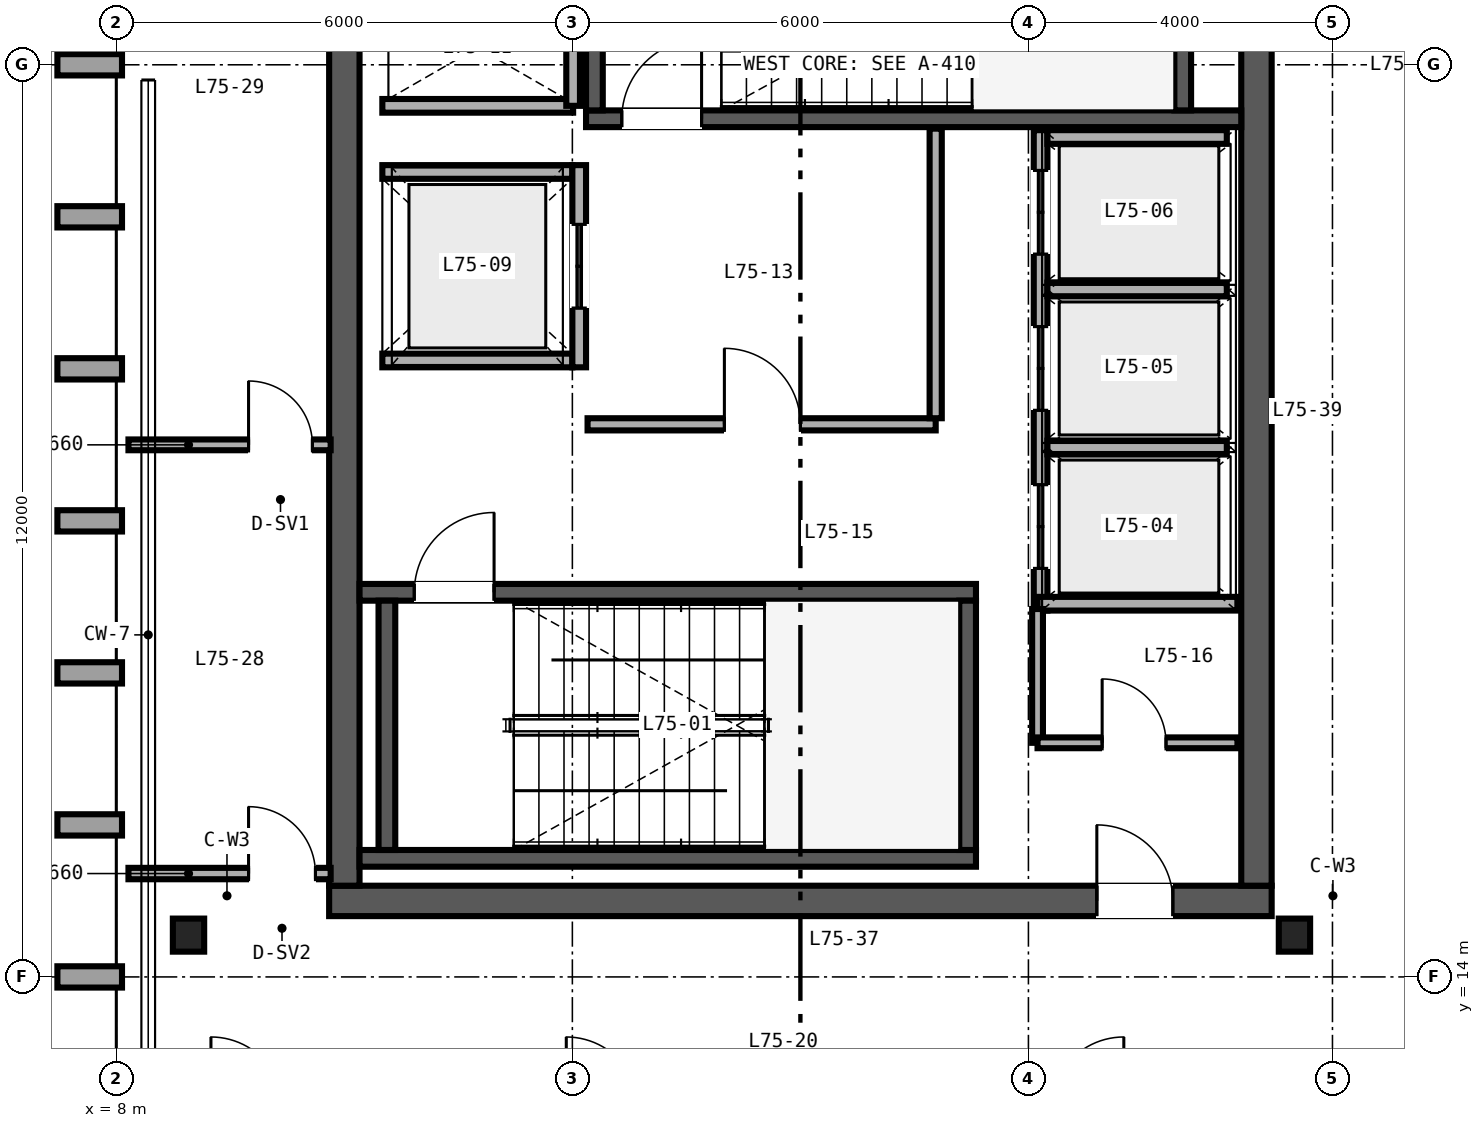
"""IFC4 building model, lengths in metres.
Left out: names, types, materials, properties, quantities, classifications, styles, units other than length and angle.
Written with IfcOpenShell. Run it as: python <this file> out.ifc"""

import sys

from ifc_helpers import new_model, si_unit, direction, frame, frame_2d, origin, origin_2d, place, context, subcontext, project, spatial, rectangle, i_section, extrude, source, transform, mapped, element, fill, save


model = new_model("IFC4")
c1 = context("Model", 3, precision=1e-05, world=origin(), true_north=direction((0.0, 1.0)))
c2 = subcontext(c1, "Body", "Model", "MODEL_VIEW")
j1 = project(units=[si_unit("LENGTHUNIT", "METRE"), si_unit("PLANEANGLEUNIT", "RADIAN")], contexts=[c1])
p1 = place(None, origin())
s1 = spatial("IfcSite", under=j1, at=p1, CompositionType="ELEMENT")
p2 = place(p1, origin())
s2 = spatial("IfcBuilding", under=s1, at=p2, CompositionType="ELEMENT")
p3 = place(p2, frame((0.0, 0.0, 294.0)))
s3 = spatial("IfcBuildingStorey", under=s2, at=p3, CompositionType="ELEMENT", Elevation=294.0)
p4 = place(p3, frame((10.8, 15.0, 0.0), z_axis=(0.0, 0.0, 1.0), x_axis=(1.0, 0.0, 0.0)))
e1 = element("IfcWall", 1, at=p4, inside=s3, PredefinedType="SHEAR", context=c2, shape_type="SweptSolid", body=[
    extrude(rectangle(XDim=12.4, YDim=0.4, at=frame_2d((6.2, 0.0))), origin(), (0.0, 0.0, 1.0), 3.38),
])
p5 = place(p4, frame((10.1, 0.0, 0.0)))
e2 = element("IfcOpeningElement", 2, at=p5, cuts=e1, PredefinedType="OPENING", context=c2, shape_type="SweptSolid", body=[
    extrude(rectangle(XDim=1.0, YDim=2.15, at=frame_2d((0.5, 1.075))), frame((0.0, 0.21, 0.0), z_axis=(0.0, -1.0, 0.0), x_axis=(1.0, 0.0, 0.0)), (0.0, 0.0, 1.0), 0.42),
])
for number, where, z_axis, x_axis in (
    (3, (11.0, 15.2, 0.0), (0.0, 0.0, 1.0), (0.0, 1.0, 0.0)),
    (4, (23.0, 15.2, 0.0), (0.0, 0.0, 1.0), (0.0, 1.0, 0.0)),
):
    element("IfcWall", number, at=place(p3, frame(where, z_axis=z_axis, x_axis=x_axis)), inside=s3, PredefinedType="SHEAR", context=c2, shape_type="SweptSolid", body=[
        extrude(rectangle(XDim=21.6, YDim=0.4, at=frame_2d((10.8, 0.0))), origin(), (0.0, 0.0, 1.0), 3.38),
    ])
p6 = place(p3, frame((11.2, 15.56, 0.0), z_axis=(0.0, 0.0, 1.0), x_axis=(1.0, 0.0, 0.0)))
e5 = element("IfcWall", 5, at=p6, inside=s3, PredefinedType="SHEAR", context=c2, shape_type="SweptSolid", body=[
    extrude(rectangle(XDim=8.11, YDim=0.22, at=frame_2d((4.055, 0.0))), origin(), (0.0, 0.0, 1.0), 3.4),
])
p7 = place(p3, frame((11.2, 19.06, 0.0), z_axis=(0.0, 0.0, 1.0), x_axis=(1.0, 0.0, 0.0)))
e6 = element("IfcWall", 6, at=p7, inside=s3, PredefinedType="SHEAR", context=c2, shape_type="SweptSolid", body=[
    extrude(rectangle(XDim=8.11, YDim=0.22, at=frame_2d((4.055, 0.0))), origin(), (0.0, 0.0, 1.0), 3.4),
])
p8 = place(p7, frame((0.72, 0.0, 0.0)))
e7 = element("IfcOpeningElement", 7, at=p8, cuts=e6, PredefinedType="OPENING", context=c2, shape_type="SweptSolid", body=[
    extrude(rectangle(XDim=1.05, YDim=2.15, at=frame_2d((0.525, 1.075))), frame((0.0, 0.12, 0.0), z_axis=(0.0, -1.0, 0.0), x_axis=(1.0, 0.0, 0.0)), (0.0, 0.0, 1.0), 0.24),
])
for number, where, z_axis, x_axis in (
    (8, (11.56, 15.67, 0.0), (0.0, 0.0, 1.0), (0.0, 1.0, 0.0)),
    (9, (19.2, 15.67, 0.0), (0.0, 0.0, 1.0), (0.0, 1.0, 0.0)),
):
    element("IfcWall", number, at=place(p3, frame(where, z_axis=z_axis, x_axis=x_axis)), inside=s3, PredefinedType="SHEAR", context=c2, shape_type="SweptSolid", body=[
        extrude(rectangle(XDim=3.28, YDim=0.22, at=frame_2d((1.64, 0.0))), origin(), (0.0, 0.0, 1.0), 3.4),
    ])
p9 = place(p3, frame((14.18, 25.29, 0.0), z_axis=(0.0, 0.0, 1.0), x_axis=(1.0, 0.0, 0.0)))
e10 = element("IfcWall", 10, at=p9, inside=s3, PredefinedType="SHEAR", context=c2, shape_type="SweptSolid", body=[
    extrude(rectangle(XDim=8.62, YDim=0.22, at=frame_2d((4.31, 0.0))), origin(), (0.0, 0.0, 1.0), 3.4),
])
p10 = place(p9, frame((0.47, 0.0, 0.0)))
e11 = element("IfcOpeningElement", 11, at=p10, cuts=e10, PredefinedType="OPENING", context=c2, shape_type="SweptSolid", body=[
    extrude(rectangle(XDim=1.05, YDim=2.15, at=frame_2d((0.525, 1.075))), frame((0.0, 0.12, 0.0), z_axis=(0.0, -1.0, 0.0), x_axis=(1.0, 0.0, 0.0)), (0.0, 0.0, 1.0), 0.24),
])
for number, where, z_axis, x_axis in (
    (12, (14.29, 25.4, 0.0), (0.0, 0.0, 1.0), (0.0, 1.0, 0.0)),
    (13, (22.03, 25.4, 0.0), (0.0, 0.0, 1.0), (0.0, 1.0, 0.0)),
):
    element("IfcWall", number, at=place(p3, frame(where, z_axis=z_axis, x_axis=x_axis)), inside=s3, PredefinedType="SHEAR", context=c2, shape_type="SweptSolid", body=[
        extrude(rectangle(XDim=3.28, YDim=0.22, at=frame_2d((1.64, 0.0))), origin(), (0.0, 0.0, 1.0), 3.4),
    ])
m1 = source(origin(), c2, "Body", "SweptSolid", [
    extrude(i_section(OverallWidth=0.412, OverallDepth=0.435, WebThickness=0.036, FlangeThickness=0.057, FilletRadius=0.025, at=origin_2d()), origin(), (0.0, 0.0, 1.0), 3.38),
])
for number, where, z_axis, x_axis in (
    (14, (8.95, 14.55, 0.0), (0.0, 0.0, 1.0), (1.0, 0.0, 0.0)),
    (15, (23.5, 14.55, 0.0), (0.0, 0.0, 1.0), (1.0, 0.0, 0.0)),
):
    element("IfcColumn", number, at=place(p3, frame(where, z_axis=z_axis, x_axis=x_axis)), inside=s3, PredefinedType="COLUMN", context=c2, shape_type="MappedRepresentation", body=[
        mapped(m1, transform((0.0, 0.0, 0.0), scale=1.0)),
    ])
p11 = place(p3, frame((20.16, 18.82, 0.0), z_axis=(0.0, 0.0, 1.0), x_axis=(0.0, 1.0, 0.0)))
e16 = element("IfcWall", 16, at=p11, inside=s3, PredefinedType="SOLIDWALL", context=c2, shape_type="SweptSolid", body=[
    extrude(rectangle(XDim=6.32, YDim=0.18, at=frame_2d((3.16, 0.0))), origin(), (0.0, 0.0, 1.0), 2.48),
])
p12 = place(p11, frame((0.555, 0.0, 0.0)))
e17 = element("IfcOpeningElement", 17, at=p12, cuts=e16, PredefinedType="OPENING", context=c2, shape_type="SweptSolid", body=[
    extrude(rectangle(XDim=1.1, YDim=2.2, at=frame_2d((0.55, 1.1))), frame((0.0, 0.1, 0.0), z_axis=(0.0, -1.0, 0.0), x_axis=(1.0, 0.0, 0.0)), (0.0, 0.0, 1.0), 0.2),
])
p13 = place(p11, frame((2.635, 0.0, 0.0)))
e18 = element("IfcOpeningElement", 18, at=p13, cuts=e16, PredefinedType="OPENING", context=c2, shape_type="SweptSolid", body=[
    extrude(rectangle(XDim=1.1, YDim=2.2, at=frame_2d((0.55, 1.1))), frame((0.0, 0.1, 0.0), z_axis=(0.0, -1.0, 0.0), x_axis=(1.0, 0.0, 0.0)), (0.0, 0.0, 1.0), 0.2),
])
p14 = place(p11, frame((4.69, 0.0, 0.0)))
e19 = element("IfcOpeningElement", 19, at=p14, cuts=e16, PredefinedType="OPENING", context=c2, shape_type="SweptSolid", body=[
    extrude(rectangle(XDim=1.1, YDim=2.2, at=frame_2d((0.55, 1.1))), frame((0.0, 0.1, 0.0), z_axis=(0.0, -1.0, 0.0), x_axis=(1.0, 0.0, 0.0)), (0.0, 0.0, 1.0), 0.2),
])
p15 = place(p3, frame((20.12, 18.91, 0.0), z_axis=(0.0, 0.0, 1.0), x_axis=(1.0, 0.0, 0.0)))
e20 = element("IfcWall", 20, at=p15, inside=s3, PredefinedType="SOLIDWALL", context=c2, shape_type="SweptSolid", body=[
    extrude(rectangle(XDim=2.63, YDim=0.18, at=frame_2d((1.315, 0.0))), origin(), (0.0, 0.0, 1.0), 3.38),
])
p16 = place(p3, frame((20.25, 25.05, 0.0), z_axis=(0.0, 0.0, 1.0), x_axis=(1.0, 0.0, 0.0)))
e21 = element("IfcWall", 21, at=p16, inside=s3, PredefinedType="SOLIDWALL", context=c2, shape_type="SweptSolid", body=[
    extrude(rectangle(XDim=2.36, YDim=0.18, at=frame_2d((1.18, 0.0))), origin(), (0.0, 0.0, 1.0), 3.38),
])
p17 = place(p3, frame((20.25, 20.965, 0.0), z_axis=(0.0, 0.0, 1.0), x_axis=(1.0, 0.0, 0.0)))
e22 = element("IfcWall", 22, at=p17, inside=s3, PredefinedType="SOLIDWALL", context=c2, shape_type="SweptSolid", body=[
    extrude(rectangle(XDim=2.36, YDim=0.18, at=frame_2d((1.18, 0.0))), origin(), (0.0, 0.0, 1.0), 2.48),
])
p18 = place(p3, frame((20.25, 23.045, 0.0), z_axis=(0.0, 0.0, 1.0), x_axis=(1.0, 0.0, 0.0)))
e23 = element("IfcWall", 23, at=p18, inside=s3, PredefinedType="SOLIDWALL", context=c2, shape_type="SweptSolid", body=[
    extrude(rectangle(XDim=2.36, YDim=0.18, at=frame_2d((1.18, 0.0))), origin(), (0.0, 0.0, 1.0), 3.38),
])
for number, where, z_axis, x_axis in (
    (24, (11.5, 22.11, 0.0), (0.0, 0.0, 1.0), (1.0, 0.0, 0.0)),
    (25, (11.5, 24.59, 0.0), (0.0, 0.0, 1.0), (1.0, 0.0, 0.0)),
):
    element("IfcWall", number, at=place(p3, frame(where, z_axis=z_axis, x_axis=x_axis)), inside=s3, PredefinedType="SOLIDWALL", context=c2, shape_type="SweptSolid", body=[
        extrude(rectangle(XDim=2.5, YDim=0.18, at=frame_2d((1.25, 0.0))), origin(), (0.0, 0.0, 1.0), 3.38),
    ])
p19 = place(p3, frame((14.09, 22.02, 0.0), z_axis=(0.0, 0.0, 1.0), x_axis=(0.0, 1.0, 0.0)))
e26 = element("IfcWall", 26, at=p19, inside=s3, PredefinedType="SOLIDWALL", context=c2, shape_type="SweptSolid", body=[
    extrude(rectangle(XDim=2.66, YDim=0.18, at=frame_2d((1.33, 0.0))), origin(), (0.0, 0.0, 1.0), 3.38),
])
p20 = place(p19, frame((0.78, 0.0, 0.0)))
e27 = element("IfcOpeningElement", 27, at=p20, cuts=e26, PredefinedType="OPENING", context=c2, shape_type="SweptSolid", body=[
    extrude(rectangle(XDim=1.1, YDim=2.2, at=frame_2d((0.55, 1.1))), frame((0.0, 0.1, 0.0), z_axis=(0.0, -1.0, 0.0), x_axis=(1.0, 0.0, 0.0)), (0.0, 0.0, 1.0), 0.2),
])
p21 = place(p3, frame((11.5, 25.46, 0.0), z_axis=(0.0, 0.0, 1.0), x_axis=(1.0, 0.0, 0.0)))
e28 = element("IfcWall", 28, at=p21, inside=s3, PredefinedType="SOLIDWALL", context=c2, shape_type="SweptSolid", body=[
    extrude(rectangle(XDim=2.51, YDim=0.18, at=frame_2d((1.255, 0.0))), origin(), (0.0, 0.0, 1.0), 3.38),
])
p22 = place(p3, frame((14.01, 25.46, 0.0), z_axis=(0.0, 0.0, 1.0), x_axis=(0.0, 1.0, 0.0)))
e29 = element("IfcWall", 29, at=p22, inside=s3, PredefinedType="SOLIDWALL", context=c2, shape_type="SweptSolid", body=[
    extrude(rectangle(XDim=3.08, YDim=0.18, at=frame_2d((1.54, 0.0))), origin(), (0.0, 0.0, 1.0), 3.38),
])
p23 = place(p3, frame((14.2, 21.27, 0.0), z_axis=(0.0, 0.0, 1.0), x_axis=(1.0, 0.0, 0.0)))
e30 = element("IfcWall", 30, at=p23, inside=s3, PredefinedType="PARTITIONING", context=c2, shape_type="SweptSolid", body=[
    extrude(rectangle(XDim=4.58, YDim=0.16, at=frame_2d((2.29, 0.0))), origin(), (0.0, 0.0, 1.0), 3.38),
])
p24 = place(p23, frame((1.8, 0.0, 0.0)))
e31 = element("IfcOpeningElement", 31, at=p24, cuts=e30, PredefinedType="OPENING", context=c2, shape_type="SweptSolid", body=[
    extrude(rectangle(XDim=1.0, YDim=2.15, at=frame_2d((0.5, 1.075))), frame((0.0, 0.09, 0.0), z_axis=(0.0, -1.0, 0.0), x_axis=(1.0, 0.0, 0.0)), (0.0, 0.0, 1.0), 0.18),
])
p25 = place(p3, frame((18.78, 21.35, 0.0), z_axis=(0.0, 0.0, 1.0), x_axis=(0.0, 1.0, 0.0)))
e32 = element("IfcWall", 32, at=p25, inside=s3, PredefinedType="PARTITIONING", context=c2, shape_type="SweptSolid", body=[
    extrude(rectangle(XDim=3.81, YDim=0.16, at=frame_2d((1.905, 0.0))), origin(), (0.0, 0.0, 1.0), 3.38),
])
p26 = place(p3, frame((20.12, 17.08, 0.0), z_axis=(0.0, 0.0, 1.0), x_axis=(0.0, 1.0, 0.0)))
e33 = element("IfcWall", 33, at=p26, inside=s3, PredefinedType="PARTITIONING", context=c2, shape_type="SweptSolid", body=[
    extrude(rectangle(XDim=1.76, YDim=0.142, at=frame_2d((0.88, 0.0))), origin(), (0.0, 0.0, 1.0), 3.38),
])
p27 = place(p3, frame((20.12, 17.08, 0.0), z_axis=(0.0, 0.0, 1.0), x_axis=(1.0, 0.0, 0.0)))
e34 = element("IfcWall", 34, at=p27, inside=s3, PredefinedType="PARTITIONING", context=c2, shape_type="SweptSolid", body=[
    extrude(rectangle(XDim=2.63, YDim=0.142, at=frame_2d((1.315, 0.0))), origin(), (0.0, 0.0, 1.0), 3.38),
])
p28 = place(p27, frame((0.85, 0.0, 0.0)))
e35 = element("IfcOpeningElement", 35, at=p28, cuts=e34, PredefinedType="OPENING", context=c2, shape_type="SweptSolid", body=[
    extrude(rectangle(XDim=0.84, YDim=2.1, at=frame_2d((0.42, 1.05))), frame((0.0, 0.081, 0.0), z_axis=(0.0, -1.0, 0.0), x_axis=(1.0, 0.0, 0.0)), (0.0, 0.0, 1.0), 0.162),
])
p29 = place(p3, frame((8.16, 15.36, 0.0), z_axis=(0.0, 0.0, 1.0), x_axis=(1.0, 0.0, 0.0)))
e36 = element("IfcWall", 36, at=p29, inside=s3, PredefinedType="PARTITIONING", context=c2, shape_type="SweptSolid", body=[
    extrude(rectangle(XDim=2.66, YDim=0.15, at=frame_2d((1.33, 0.0))), origin(), (0.0, 0.0, 1.0), 2.601),
])
p30 = place(p29, frame((1.58, 0.0, 0.0)))
e37 = element("IfcOpeningElement", 37, at=p30, cuts=e36, PredefinedType="OPENING", context=c2, shape_type="SweptSolid", body=[
    extrude(rectangle(XDim=0.88, YDim=2.15, at=frame_2d((0.44, 1.075))), frame((0.0, 0.085, 0.0), z_axis=(0.0, -1.0, 0.0), x_axis=(1.0, 0.0, 0.0)), (0.0, 0.0, 1.0), 0.17),
])
p31 = place(p3, frame((8.16, 21.0, 0.0), z_axis=(0.0, 0.0, 1.0), x_axis=(1.0, 0.0, 0.0)))
e38 = element("IfcWall", 38, at=p31, inside=s3, PredefinedType="PARTITIONING", context=c2, shape_type="SweptSolid", body=[
    extrude(rectangle(XDim=2.66, YDim=0.142, at=frame_2d((1.33, 0.0))), origin(), (0.0, 0.0, 1.0), 2.48),
])
p32 = place(p31, frame((1.58, 0.0, 0.0)))
e39 = element("IfcOpeningElement", 39, at=p32, cuts=e38, PredefinedType="OPENING", context=c2, shape_type="SweptSolid", body=[
    extrude(rectangle(XDim=0.84, YDim=2.1, at=frame_2d((0.42, 1.05))), frame((0.0, 0.081, 0.0), z_axis=(0.0, -1.0, 0.0), x_axis=(1.0, 0.0, 0.0)), (0.0, 0.0, 1.0), 0.162),
])
m2 = source(origin(), c2, "Body", "SweptSolid", [
    extrude(rectangle(XDim=1.05, YDim=2.15, at=frame_2d((0.525, 1.075))), frame((0.0, 0.025, 0.0), z_axis=(0.0, -1.0, 0.0), x_axis=(1.0, 0.0, 0.0)), (0.0, 0.0, 1.0), 0.05),
])
p33 = place(p8, origin())
e40 = element("IfcDoor", 40, at=p33, inside=s3, OperationType="SINGLE_SWING_RIGHT", PredefinedType="DOOR", context=c2, shape_type="MappedRepresentation", body=[
    mapped(m2, transform((0.0, 0.0, 0.0), scale=1.0)),
])
fill(e7, e40)
p34 = place(p10, origin())
e41 = element("IfcDoor", 41, at=p34, inside=s3, OperationType="SINGLE_SWING_RIGHT", PredefinedType="DOOR", context=c2, shape_type="MappedRepresentation", body=[
    mapped(m2, transform((0.0, 0.0, 0.0), scale=1.0)),
])
fill(e11, e41)
m3 = source(origin(), c2, "Body", "SweptSolid", [
    extrude(rectangle(XDim=1.1, YDim=2.2, at=frame_2d((0.55, 1.1))), frame((0.0, 0.025, 0.0), z_axis=(0.0, -1.0, 0.0), x_axis=(1.0, 0.0, 0.0)), (0.0, 0.0, 1.0), 0.05),
])
p35 = place(p12, origin())
e42 = element("IfcDoor", 42, at=p35, inside=s3, OperationType="DOUBLE_DOOR_SLIDING", PredefinedType="DOOR", context=c2, shape_type="MappedRepresentation", body=[
    mapped(m3, transform((0.0, 0.0, 0.0), scale=1.0)),
])
fill(e17, e42)
p36 = place(p13, origin())
e43 = element("IfcDoor", 43, at=p36, inside=s3, OperationType="DOUBLE_DOOR_SLIDING", PredefinedType="DOOR", context=c2, shape_type="MappedRepresentation", body=[
    mapped(m3, transform((0.0, 0.0, 0.0), scale=1.0)),
])
fill(e18, e43)
p37 = place(p14, origin())
e44 = element("IfcDoor", 44, at=p37, inside=s3, OperationType="DOUBLE_DOOR_SLIDING", PredefinedType="DOOR", context=c2, shape_type="MappedRepresentation", body=[
    mapped(m3, transform((0.0, 0.0, 0.0), scale=1.0)),
])
fill(e19, e44)
p38 = place(p20, origin())
e45 = element("IfcDoor", 45, at=p38, inside=s3, OperationType="DOUBLE_DOOR_SLIDING", PredefinedType="DOOR", context=c2, shape_type="MappedRepresentation", body=[
    mapped(m3, transform((0.0, 0.0, 0.0), scale=1.0)),
])
fill(e27, e45)
m4 = source(origin(), c2, "Body", "SweptSolid", [
    extrude(rectangle(XDim=1.0, YDim=2.15, at=frame_2d((0.5, 1.075))), frame((0.0, 0.025, 0.0), z_axis=(0.0, -1.0, 0.0), x_axis=(1.0, 0.0, 0.0)), (0.0, 0.0, 1.0), 0.05),
])
p39 = place(p24, origin())
e46 = element("IfcDoor", 46, at=p39, inside=s3, OperationType="SINGLE_SWING_LEFT", PredefinedType="DOOR", context=c2, shape_type="MappedRepresentation", body=[
    mapped(m4, transform((0.0, 0.0, 0.0), scale=1.0)),
])
fill(e31, e46)
m5 = source(origin(), c2, "Body", "SweptSolid", [
    extrude(rectangle(XDim=0.84, YDim=2.1, at=frame_2d((0.42, 1.05))), frame((0.0, 0.025, 0.0), z_axis=(0.0, -1.0, 0.0), x_axis=(1.0, 0.0, 0.0)), (0.0, 0.0, 1.0), 0.05),
])
p40 = place(p28, origin())
e47 = element("IfcDoor", 47, at=p40, inside=s3, OperationType="SINGLE_SWING_LEFT", PredefinedType="DOOR", context=c2, shape_type="MappedRepresentation", body=[
    mapped(m5, transform((0.0, 0.0, 0.0), scale=1.0)),
])
fill(e35, e47)
p41 = place(p5, origin())
e48 = element("IfcDoor", 48, at=p41, inside=s3, OperationType="SINGLE_SWING_LEFT", PredefinedType="DOOR", context=c2, shape_type="MappedRepresentation", body=[
    mapped(m4, transform((0.0, 0.0, 0.0), scale=1.0)),
])
fill(e2, e48)
m6 = source(origin(), c2, "Body", "SweptSolid", [
    extrude(rectangle(XDim=0.88, YDim=2.15, at=frame_2d((0.44, 1.075))), frame((0.0, 0.025, 0.0), z_axis=(0.0, -1.0, 0.0), x_axis=(1.0, 0.0, 0.0)), (0.0, 0.0, 1.0), 0.05),
])
p42 = place(p30, origin())
e49 = element("IfcDoor", 49, at=p42, inside=s3, OperationType="SINGLE_SWING_LEFT", PredefinedType="DOOR", context=c2, shape_type="MappedRepresentation", body=[
    mapped(m6, transform((0.0, 0.0, 0.0), scale=1.0)),
])
fill(e37, e49)
p43 = place(p32, origin())
e50 = element("IfcDoor", 50, at=p43, inside=s3, OperationType="SINGLE_SWING_LEFT", PredefinedType="DOOR", context=c2, shape_type="MappedRepresentation", body=[
    mapped(m5, transform((0.0, 0.0, 0.0), scale=1.0)),
])
fill(e39, e50)
save(model, sys.argv[1])
